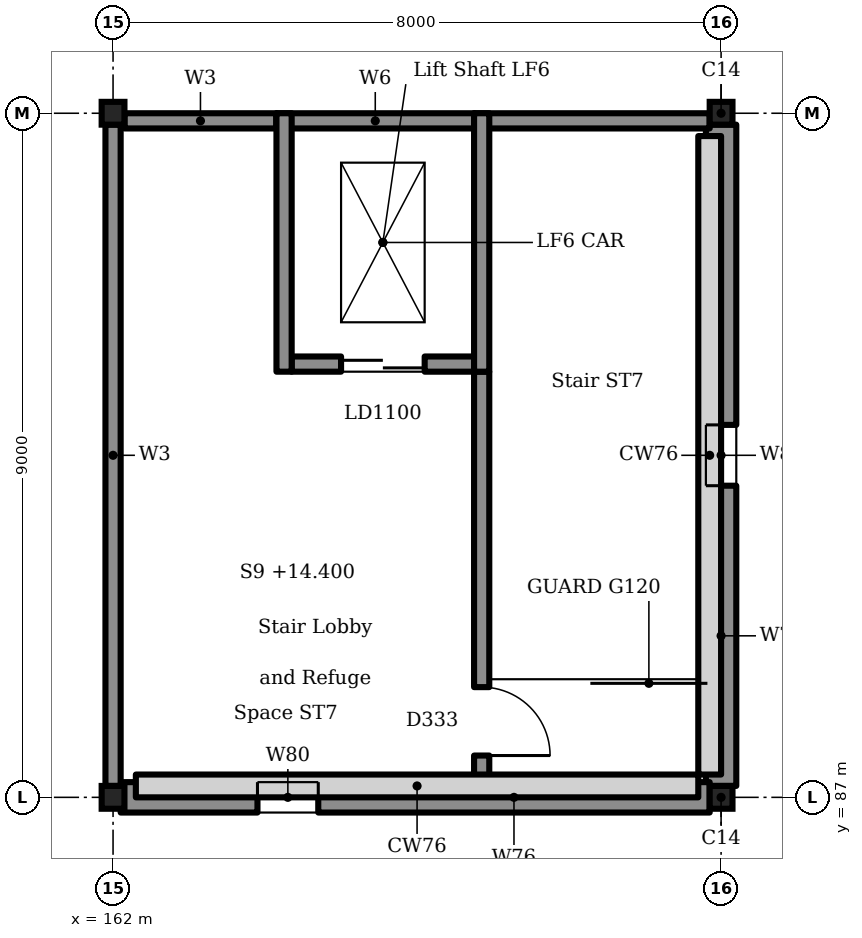
"""IFC4 building model, lengths in metres.
Left out: names, types, materials, properties, quantities, classifications, styles, units other than length and angle.
Written with IfcOpenShell. Run it as: python <this file> out.ifc"""

import sys

from ifc_helpers import new_model, si_unit, direction, frame, frame_2d, origin, origin_2d, place, context, subcontext, project, spatial, polyline, rectangle, i_section, outline, extrude, element, fill, save


model = new_model("IFC4")
c1 = context("Model", 3, precision=1e-05, world=origin(), true_north=direction((0.0, 1.0)))
c2 = subcontext(c1, "Body", "Model", "MODEL_VIEW")
j1 = project(units=[si_unit("LENGTHUNIT", "METRE"), si_unit("PLANEANGLEUNIT", "RADIAN")], contexts=[c1])
p1 = place(None, origin())
s1 = spatial("IfcSite", under=j1, at=p1, CompositionType="ELEMENT")
p2 = place(p1, origin())
s2 = spatial("IfcBuilding", under=s1, at=p2, CompositionType="ELEMENT")
p3 = place(p2, frame((0.0, 0.0, 14.4)))
s3 = spatial("IfcBuildingStorey", under=s2, at=p3, CompositionType="ELEMENT", Elevation=14.4)
for number, where, z_axis, x_axis in (
    (1, (170.0, 87.0, 0.0), (0.0, 0.0, 1.0), (1.0, 0.0, 0.0)),
    (2, (170.0, 96.0, 0.0), (0.0, 0.0, 1.0), (1.0, 0.0, 0.0)),
    (3, (162.0, 87.0, 0.0), (0.0, 0.0, 1.0), (1.0, 0.0, 0.0)),
    (4, (162.0, 96.0, 0.0), (0.0, 0.0, 1.0), (1.0, 0.0, 0.0)),
):
    element("IfcColumn", number, at=place(p3, frame(where, z_axis=z_axis, x_axis=x_axis)), inside=s3, PredefinedType="COLUMN", context=c2, shape_type="SweptSolid", body=[
        extrude(i_section(OverallWidth=0.3, OverallDepth=0.3, WebThickness=0.011, FlangeThickness=0.019, FilletRadius=0.027, at=origin_2d()), origin(), (0.0, 0.0, 1.0), 3.75),
    ])
p4 = place(p3, frame((170.0, 87.15, 0.0), z_axis=(0.0, 0.0, 1.0), x_axis=(0.0, 1.0, 0.0)))
e5 = element("IfcWall", 5, at=p4, inside=s3, PredefinedType="SOLIDWALL", context=c2, shape_type="SweptSolid", body=[
    extrude(rectangle(XDim=8.7, YDim=0.4, at=frame_2d((4.35, 0.0))), origin(), (0.0, 0.0, 1.0), 3.75),
])
p5 = place(p4, frame((3.95, 0.0, 0.9)))
e6 = element("IfcOpeningElement", 6, at=p5, cuts=e5, PredefinedType="OPENING", context=c2, shape_type="SweptSolid", body=[
    extrude(rectangle(XDim=0.8, YDim=1.8, at=frame_2d((0.4, 0.9))), frame((0.0, 0.21, 0.0), z_axis=(0.0, -1.0, 0.0), x_axis=(1.0, 0.0, 0.0)), (0.0, 0.0, 1.0), 0.42),
])
p6 = place(p3, frame((162.1, 87.0, 0.0), z_axis=(0.0, 0.0, 1.0), x_axis=(1.0, 0.0, 0.0)))
e7 = element("IfcWall", 7, at=p6, inside=s3, PredefinedType="SOLIDWALL", context=c2, shape_type="SweptSolid", body=[
    extrude(rectangle(XDim=7.75, YDim=0.4, at=frame_2d((3.875, 0.0))), origin(), (0.0, 0.0, 1.0), 3.75),
])
p7 = place(p6, frame((1.8, 0.0, 0.9)))
e8 = element("IfcOpeningElement", 8, at=p7, cuts=e7, PredefinedType="OPENING", context=c2, shape_type="SweptSolid", body=[
    extrude(rectangle(XDim=0.8, YDim=1.8, at=frame_2d((0.4, 0.9))), frame((0.0, 0.21, 0.0), z_axis=(0.0, -1.0, 0.0), x_axis=(1.0, 0.0, 0.0)), (0.0, 0.0, 1.0), 0.42),
])
p8 = place(p2, frame((0.0, 0.0, 9.9)))
s4 = spatial("IfcBuildingStorey", under=s2, at=p8, CompositionType="ELEMENT", Elevation=9.9)
p9 = place(p8, frame((158.0, 86.788, 2.85), z_axis=(0.0, 0.0, 1.0), x_axis=(1.0, 0.0, 0.0)))
e9 = element("IfcWall", 9, at=p9, inside=s4, PredefinedType="SOLIDWALL", context=c2, shape_type="SweptSolid", body=[
    extrude(rectangle(XDim=3.85, YDim=0.225, at=frame_2d((1.925, 0.0))), origin(), (0.0, 0.0, 1.0), 4.65),
])
p10 = place(p3, frame((162.0, 87.15, 0.0), z_axis=(0.0, 0.0, 1.0), x_axis=(0.0, 1.0, 0.0)))
e10 = element("IfcWall", 10, at=p10, inside=s3, PredefinedType="SOLIDWALL", context=c2, shape_type="SweptSolid", body=[
    extrude(rectangle(XDim=8.7, YDim=0.2, at=frame_2d((4.35, 0.0))), origin(), (0.0, 0.0, 1.0), 3.75),
])
p11 = place(p3, frame((162.15, 95.9, 0.0), z_axis=(0.0, 0.0, 1.0), x_axis=(1.0, 0.0, 0.0)))
e11 = element("IfcWall", 11, at=p11, inside=s3, PredefinedType="SOLIDWALL", context=c2, shape_type="SweptSolid", body=[
    extrude(rectangle(XDim=2.0, YDim=0.2, at=frame_2d((1.0, 0.0))), origin(), (0.0, 0.0, 1.0), 3.75),
])
p12 = place(p3, frame((166.75, 95.9, 0.0), z_axis=(0.0, 0.0, 1.0), x_axis=(1.0, 0.0, 0.0)))
e12 = element("IfcWall", 12, at=p12, inside=s3, PredefinedType="SOLIDWALL", context=c2, shape_type="SweptSolid", body=[
    extrude(rectangle(XDim=3.1, YDim=0.2, at=frame_2d((1.55, 0.0))), origin(), (0.0, 0.0, 1.0), 3.75),
])
p13 = place(p3, frame((166.85, 87.15, 0.0), z_axis=(0.0, 0.0, 1.0), x_axis=(0.0, 1.0, 0.0)))
e13 = element("IfcWall", 13, at=p13, inside=s3, PredefinedType="SOLIDWALL", context=c2, shape_type="SweptSolid", body=[
    extrude(rectangle(XDim=5.45, YDim=0.2, at=frame_2d((2.725, 0.0))), origin(), (0.0, 0.0, 1.0), 3.75),
])
p14 = place(p13, frame((0.4, 0.0, 0.0)))
e14 = element("IfcOpeningElement", 14, at=p14, cuts=e13, PredefinedType="OPENING", context=c2, shape_type="SweptSolid", body=[
    extrude(rectangle(XDim=0.9, YDim=2.1, at=frame_2d((0.45, 1.05))), frame((0.0, 0.11, 0.0), z_axis=(0.0, -1.0, 0.0), x_axis=(1.0, 0.0, 0.0)), (0.0, 0.0, 1.0), 0.22),
])
p15 = place(p3, frame((164.15, 95.9, 0.0), z_axis=(0.0, 0.0, 1.0), x_axis=(1.0, 0.0, 0.0)))
e15 = element("IfcWall", 15, at=p15, inside=s3, PredefinedType="SOLIDWALL", context=c2, shape_type="SweptSolid", body=[
    extrude(rectangle(XDim=2.6, YDim=0.2, at=frame_2d((1.3, 0.0))), origin(), (0.0, 0.0, 1.0), 3.5),
])
p16 = place(p3, frame((164.35, 92.7, 0.0), z_axis=(0.0, 0.0, 1.0), x_axis=(1.0, 0.0, 0.0)))
e16 = element("IfcWall", 16, at=p16, inside=s3, PredefinedType="SOLIDWALL", context=c2, shape_type="SweptSolid", body=[
    extrude(rectangle(XDim=2.4, YDim=0.2, at=frame_2d((1.2, 0.0))), origin(), (0.0, 0.0, 1.0), 3.5),
])
p17 = place(p16, frame((0.65, 0.0, 0.0)))
e17 = element("IfcOpeningElement", 17, at=p17, cuts=e16, PredefinedType="OPENING", context=c2, shape_type="SweptSolid", body=[
    extrude(rectangle(XDim=1.1, YDim=2.1, at=frame_2d((0.55, 1.05))), frame((0.0, 0.11, 0.0), z_axis=(0.0, -1.0, 0.0), x_axis=(1.0, 0.0, 0.0)), (0.0, 0.0, 1.0), 0.22),
])
for number, where, z_axis, x_axis in (
    (18, (164.25, 92.6, 0.0), (0.0, 0.0, 1.0), (0.0, 1.0, 0.0)),
    (19, (166.85, 92.6, 0.0), (0.0, 0.0, 1.0), (0.0, 1.0, 0.0)),
):
    element("IfcWall", number, at=place(p3, frame(where, z_axis=z_axis, x_axis=x_axis)), inside=s3, PredefinedType="SOLIDWALL", context=c2, shape_type="SweptSolid", body=[
        extrude(rectangle(XDim=3.4, YDim=0.2, at=frame_2d((1.7, 0.0))), origin(), (0.0, 0.0, 1.0), 3.5),
    ])
p18 = place(p3, frame((169.85, 87.3, 4.0), z_axis=(0.0, 0.0, 1.0), x_axis=(0.0, 1.0, 0.0)))
e20 = element("IfcWall", 20, at=p18, inside=s3, PredefinedType="PARAPET", context=c2, shape_type="SweptSolid", body=[
    extrude(outline(polyline([(0.0, 0.0), (8.4, 0.0), (8.4, 0.55), (8.1, 0.557), (7.8, 0.577), (7.5, 0.606), (7.2, 0.683), (6.9, 0.812), (6.6, 0.973), (6.3, 1.146), (6.0, 1.317), (5.7, 1.471), (5.4, 1.696), (5.1, 1.951), (4.8, 2.17), (4.5, 2.328), (4.2, 2.4), (3.9, 2.328), (3.6, 2.17), (3.3, 1.951), (3.0, 1.696), (2.7, 1.471), (2.4, 1.317), (2.1, 1.146), (1.8, 0.973), (1.5, 0.812), (1.2, 0.683), (0.9, 0.606), (0.6, 0.577), (0.3, 0.557), (0.0, 0.55), (0.0, 0.0)])), frame((0.0, 0.15, 0.0), z_axis=(0.0, -1.0, 0.0), x_axis=(1.0, 0.0, 0.0)), (0.0, 0.0, 1.0), 0.3),
])
p19 = place(p3, frame((162.3, 87.15, 4.0), z_axis=(0.0, 0.0, 1.0), x_axis=(1.0, 0.0, 0.0)))
e21 = element("IfcWall", 21, at=p19, inside=s3, PredefinedType="PARAPET", context=c2, shape_type="SweptSolid", body=[
    extrude(outline(polyline([(0.0, 0.0), (7.4, 0.0), (7.4, 0.55), (7.104, 0.559), (6.808, 0.583), (6.512, 0.626), (6.216, 0.74), (5.92, 0.906), (5.624, 1.098), (5.328, 1.29), (5.032, 1.465), (4.736, 1.717), (4.44, 1.999), (4.144, 2.229), (3.848, 2.372), (3.552, 2.372), (3.256, 2.229), (2.96, 1.999), (2.664, 1.717), (2.368, 1.465), (2.072, 1.29), (1.776, 1.098), (1.48, 0.906), (1.184, 0.74), (0.888, 0.626), (0.592, 0.583), (0.296, 0.559), (0.0, 0.55), (0.0, 0.0)])), frame((0.0, 0.15, 0.0), z_axis=(0.0, -1.0, 0.0), x_axis=(1.0, 0.0, 0.0)), (0.0, 0.0, 1.0), 0.3),
])
p20 = place(p7, origin())
e22 = element("IfcWindow", 22, at=p20, inside=s3, PartitioningType="SINGLE_PANEL", PredefinedType="WINDOW", context=c2, shape_type="SweptSolid", body=[
    extrude(rectangle(XDim=0.8, YDim=1.8, at=frame_2d((0.4, 0.9))), frame((0.0, 0.03, 0.0), z_axis=(0.0, -1.0, 0.0), x_axis=(1.0, 0.0, 0.0)), (0.0, 0.0, 1.0), 0.06),
])
fill(e8, e22)
p21 = place(p5, origin())
e23 = element("IfcWindow", 23, at=p21, inside=s3, PartitioningType="SINGLE_PANEL", PredefinedType="WINDOW", context=c2, shape_type="SweptSolid", body=[
    extrude(rectangle(XDim=0.8, YDim=1.8, at=frame_2d((0.4, 0.9))), frame((0.0, 0.03, 0.0), z_axis=(0.0, -1.0, 0.0), x_axis=(1.0, 0.0, 0.0)), (0.0, 0.0, 1.0), 0.06),
])
fill(e6, e23)
p22 = place(p17, origin())
e24 = element("IfcDoor", 24, at=p22, inside=s3, OperationType="SLIDING_TO_LEFT", PredefinedType="DOOR", context=c2, shape_type="SweptSolid", body=[
    extrude(rectangle(XDim=1.1, YDim=2.1, at=frame_2d((0.55, 1.05))), frame((0.0, 0.025, 0.0), z_axis=(0.0, -1.0, 0.0), x_axis=(1.0, 0.0, 0.0)), (0.0, 0.0, 1.0), 0.05),
])
fill(e17, e24)
p23 = place(p14, frame((0.9, 0.0, 0.0), z_axis=(0.0, 0.0, 1.0), x_axis=(-1.0, 0.0, 0.0)))
e25 = element("IfcDoor", 25, at=p23, inside=s3, OperationType="SINGLE_SWING_LEFT", PredefinedType="DOOR", context=c2, shape_type="SweptSolid", body=[
    extrude(rectangle(XDim=0.9, YDim=2.1, at=frame_2d((0.45, 1.05))), frame((0.0, 0.025, 0.0), z_axis=(0.0, -1.0, 0.0), x_axis=(1.0, 0.0, 0.0)), (0.0, 0.0, 1.0), 0.05),
])
fill(e14, e25)
save(model, sys.argv[1])
